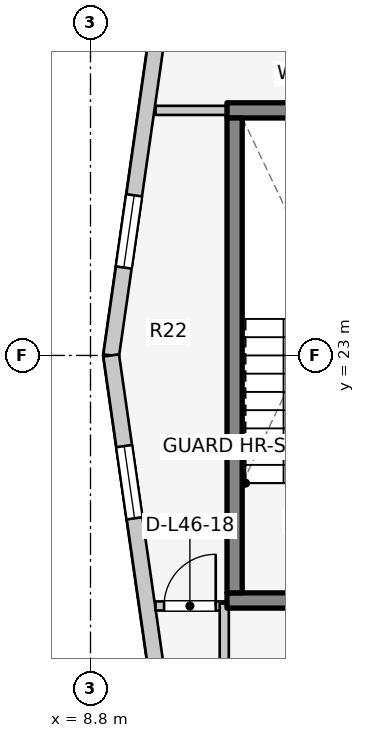
"""IFC4 building model, lengths in metres.
Left out: names, types, materials, properties, quantities, classifications, styles, units other than length and angle.
Written with IfcOpenShell. Run it as: python <this file> out.ifc"""

import sys

from ifc_helpers import new_model, si_unit, direction, frame, frame_2d, origin, place, context, subcontext, project, spatial, rectangle, extrude, element, fill, save


model = new_model("IFC4")
c1 = context("Model", 3, precision=1e-05, world=origin(), true_north=direction((0.0, 1.0)))
c2 = subcontext(c1, "Body", "Model", "MODEL_VIEW")
j1 = project(units=[si_unit("LENGTHUNIT", "METRE"), si_unit("PLANEANGLEUNIT", "RADIAN")], contexts=[c1])
p1 = place(None, origin())
s1 = spatial("IfcSite", under=j1, at=p1, CompositionType="ELEMENT")
p2 = place(p1, origin())
s2 = spatial("IfcBuilding", under=s1, at=p2, CompositionType="ELEMENT")
p3 = place(p2, frame((0.0, 0.0, 152.9)))
s3 = spatial("IfcBuildingStorey", under=s2, at=p3, CompositionType="ELEMENT", Elevation=152.9)
p4 = place(p3, frame((11.045, 18.97, 0.0), z_axis=(0.0, 0.0, 1.0), x_axis=(1.0, 0.0, 0.0)))
e1 = element("IfcWall", 1, at=p4, inside=s3, PredefinedType="SOLIDWALL", context=c2, shape_type="SweptSolid", body=[
    extrude(rectangle(XDim=3.782, YDim=0.25, at=frame_2d((1.891, 0.0))), origin(), (0.0, 0.0, 1.0), 3.1),
])
p5 = place(p4, frame((1.135, 0.0, 0.0)))
e2 = element("IfcOpeningElement", 2, at=p5, cuts=e1, PredefinedType="OPENING", context=c2, shape_type="SweptSolid", body=[
    extrude(rectangle(XDim=1.1, YDim=2.1, at=frame_2d((0.55, 1.05))), frame((0.0, 0.135, 0.0), z_axis=(0.0, -1.0, 0.0), x_axis=(1.0, 0.0, 0.0)), (0.0, 0.0, 1.0), 0.27),
])
p6 = place(p3, frame((11.045, 27.03, 0.0), z_axis=(0.0, 0.0, 1.0), x_axis=(1.0, 0.0, 0.0)))
e3 = element("IfcWall", 3, at=p6, inside=s3, PredefinedType="SOLIDWALL", context=c2, shape_type="SweptSolid", body=[
    extrude(rectangle(XDim=3.782, YDim=0.25, at=frame_2d((1.891, 0.0))), origin(), (0.0, 0.0, 1.0), 3.1),
])
p7 = place(p3, frame((11.17, 19.095, 0.0), z_axis=(0.0, 0.0, 1.0), x_axis=(0.0, 1.0, 0.0)))
e4 = element("IfcWall", 4, at=p7, inside=s3, PredefinedType="SOLIDWALL", context=c2, shape_type="SweptSolid", body=[
    extrude(rectangle(XDim=7.81, YDim=0.25, at=frame_2d((3.905, 0.0))), origin(), (0.0, 0.0, 1.0), 3.1),
])
p8 = place(p3, frame((9.93, 28.497, 0.0), z_axis=(0.0, 0.0, 1.0), x_axis=(-0.142227632286, -0.989833976288, 0.0)))
e5 = element("IfcWall", 5, at=p8, inside=s3, PredefinedType="STANDARD", context=c2, shape_type="SweptSolid", body=[
    extrude(rectangle(XDim=5.553, YDim=0.26, at=frame_2d((2.776, 0.0))), origin(), (0.0, 0.0, 1.0), 2.85),
])
p9 = place(p8, frame((2.892, 0.0, 0.75)))
e6 = element("IfcOpeningElement", 6, at=p9, cuts=e5, PredefinedType="OPENING", context=c2, shape_type="SweptSolid", body=[
    extrude(rectangle(XDim=1.2, YDim=1.5, at=frame_2d((0.6, 0.75))), frame((0.0, 0.14, 0.0), z_axis=(0.0, -1.0, 0.0), x_axis=(1.0, 0.0, 0.0)), (0.0, 0.0, 1.0), 0.28),
])
p10 = place(p3, frame((9.14, 23.0, 0.0), z_axis=(0.0, 0.0, 1.0), x_axis=(0.142227632286, -0.989833976288, 0.0)))
e7 = element("IfcWall", 7, at=p10, inside=s3, PredefinedType="STANDARD", context=c2, shape_type="SweptSolid", body=[
    extrude(rectangle(XDim=5.553, YDim=0.26, at=frame_2d((2.776, 0.0))), origin(), (0.0, 0.0, 1.0), 2.85),
])
p11 = place(p10, frame((1.506, 0.0, 0.75)))
e8 = element("IfcOpeningElement", 8, at=p11, cuts=e7, PredefinedType="OPENING", context=c2, shape_type="SweptSolid", body=[
    extrude(rectangle(XDim=1.2, YDim=1.5, at=frame_2d((0.6, 0.75))), frame((0.0, 0.14, 0.0), z_axis=(0.0, -1.0, 0.0), x_axis=(1.0, 0.0, 0.0)), (0.0, 0.0, 1.0), 0.28),
])
p12 = place(p3, frame((9.87, 27.03, 0.0), z_axis=(0.0, 0.0, 1.0), x_axis=(1.0, 0.0, 0.0)))
e9 = element("IfcWall", 9, at=p12, inside=s3, PredefinedType="PARTITIONING", context=c2, shape_type="SweptSolid", body=[
    extrude(rectangle(XDim=1.17, YDim=0.15, at=frame_2d((0.585, 0.0))), origin(), (0.0, 0.0, 1.0), 2.855),
])
p13 = place(p3, frame((9.87, 18.88, 0.0), z_axis=(0.0, 0.0, 1.0), x_axis=(1.0, 0.0, 0.0)))
e10 = element("IfcWall", 10, at=p13, inside=s3, PredefinedType="PARTITIONING", context=c2, shape_type="SweptSolid", body=[
    extrude(rectangle(XDim=1.17, YDim=0.15, at=frame_2d((0.585, 0.0))), origin(), (0.0, 0.0, 1.0), 2.855),
])
p14 = place(p13, frame((0.14, 0.0, 0.0)))
e11 = element("IfcOpeningElement", 11, at=p14, cuts=e10, PredefinedType="OPENING", context=c2, shape_type="SweptSolid", body=[
    extrude(rectangle(XDim=0.85, YDim=2.05, at=frame_2d((0.425, 1.025))), frame((0.0, 0.085, 0.0), z_axis=(0.0, -1.0, 0.0), x_axis=(1.0, 0.0, 0.0)), (0.0, 0.0, 1.0), 0.17),
])
p15 = place(p3, frame((11.0, 15.91, 0.0), z_axis=(0.0, 0.0, 1.0), x_axis=(0.0, 1.0, 0.0)))
e12 = element("IfcWall", 12, at=p15, inside=s3, PredefinedType="PARTITIONING", context=c2, shape_type="SweptSolid", body=[
    extrude(rectangle(XDim=3.01, YDim=0.15, at=frame_2d((1.505, 0.0))), origin(), (0.0, 0.0, 1.0), 2.855),
])
p16 = place(p9, origin())
e13 = element("IfcWindow", 13, at=p16, inside=s3, PartitioningType="SINGLE_PANEL", PredefinedType="WINDOW", context=c2, shape_type="SweptSolid", body=[
    extrude(rectangle(XDim=1.2, YDim=1.5, at=frame_2d((0.6, 0.75))), frame((0.0, 0.03, 0.0), z_axis=(0.0, -1.0, 0.0), x_axis=(1.0, 0.0, 0.0)), (0.0, 0.0, 1.0), 0.06),
])
fill(e6, e13)
p17 = place(p11, origin())
e14 = element("IfcWindow", 14, at=p17, inside=s3, PartitioningType="SINGLE_PANEL", PredefinedType="WINDOW", context=c2, shape_type="SweptSolid", body=[
    extrude(rectangle(XDim=1.2, YDim=1.5, at=frame_2d((0.6, 0.75))), frame((0.0, 0.03, 0.0), z_axis=(0.0, -1.0, 0.0), x_axis=(1.0, 0.0, 0.0)), (0.0, 0.0, 1.0), 0.06),
])
fill(e8, e14)
p18 = place(p14, origin())
e15 = element("IfcDoor", 15, at=p18, inside=s3, OperationType="SINGLE_SWING_RIGHT", PredefinedType="DOOR", context=c2, shape_type="SweptSolid", body=[
    extrude(rectangle(XDim=0.85, YDim=2.05, at=frame_2d((0.425, 1.025))), frame((0.0, 0.025, 0.0), z_axis=(0.0, -1.0, 0.0), x_axis=(1.0, 0.0, 0.0)), (0.0, 0.0, 1.0), 0.05),
])
fill(e11, e15)
save(model, sys.argv[1])
